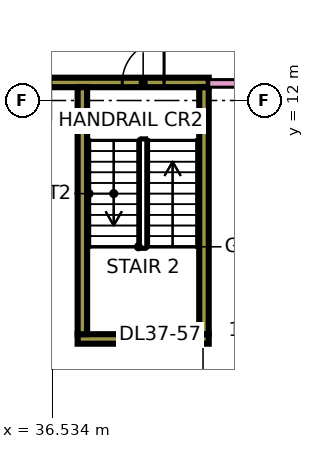
"""IFC4 building model, lengths in metres.
Left out: names, types, materials, properties, quantities, classifications, styles, units other than length and angle.
Written with IfcOpenShell. Run it as: python <this file> out.ifc"""

import sys

from ifc_helpers import new_model, si_unit, direction, frame, frame_2d, origin, place, context, subcontext, project, spatial, rectangle, extrude, element, fill, save


model = new_model("IFC4")
c1 = context("Model", 3, precision=1e-05, world=origin(), true_north=direction((0.0, 1.0)))
c2 = subcontext(c1, "Body", "Model", "MODEL_VIEW")
j1 = project(units=[si_unit("LENGTHUNIT", "METRE"), si_unit("PLANEANGLEUNIT", "RADIAN")], contexts=[c1])
p1 = place(None, origin())
s1 = spatial("IfcSite", under=j1, at=p1, CompositionType="ELEMENT")
p2 = place(p1, origin())
s2 = spatial("IfcBuilding", under=s1, at=p2, CompositionType="ELEMENT")
p3 = place(p2, frame((0.0, 0.0, 164.9)))
s3 = spatial("IfcBuildingStorey", under=s2, at=p3, CompositionType="ELEMENT", Elevation=164.9)
p4 = place(p3, frame((37.2, 5.725, 0.0), z_axis=(0.0, 0.0, 1.0), x_axis=(1.0, 0.0, 0.0)))
e1 = element("IfcWall", 1, at=p4, inside=s3, PredefinedType="SHEAR", context=c2, shape_type="SweptSolid", body=[
    extrude(rectangle(XDim=3.45, YDim=0.25, at=frame_2d((1.725, 0.0))), origin(), (0.0, 0.0, 1.0), 3.75),
])
p5 = place(p3, frame((36.45, 12.475, 0.0), z_axis=(0.0, 0.0, 1.0), x_axis=(1.0, 0.0, 0.0)))
e2 = element("IfcWall", 2, at=p5, inside=s3, PredefinedType="SHEAR", context=c2, shape_type="SweptSolid", body=[
    extrude(rectangle(XDim=4.2, YDim=0.25, at=frame_2d((2.1, 0.0))), origin(), (0.0, 0.0, 1.0), 3.75),
])
p6 = place(p5, frame((1.925, 0.0, 0.0)))
e3 = element("IfcOpeningElement", 3, at=p6, cuts=e2, PredefinedType="OPENING", context=c2, shape_type="SweptSolid", body=[
    extrude(rectangle(XDim=1.1, YDim=2.2, at=frame_2d((0.55, 1.1))), frame((0.0, 0.135, 0.0), z_axis=(0.0, -1.0, 0.0), x_axis=(1.0, 0.0, 0.0)), (0.0, 0.0, 1.0), 0.27),
])
for number, where, z_axis, x_axis in (
    (4, (37.325, 5.85, 0.0), (0.0, 0.0, 1.0), (0.0, 1.0, 0.0)),
    (5, (40.525, 5.85, 0.0), (0.0, 0.0, 1.0), (0.0, 1.0, 0.0)),
):
    element("IfcWall", number, at=place(p3, frame(where, z_axis=z_axis, x_axis=x_axis)), inside=s3, PredefinedType="SHEAR", context=c2, shape_type="SweptSolid", body=[
        extrude(rectangle(XDim=6.5, YDim=0.25, at=frame_2d((3.25, 0.0))), origin(), (0.0, 0.0, 1.0), 3.75),
    ])
p7 = place(p3, frame((40.65, 12.45, 0.0), z_axis=(0.0, 0.0, 1.0), x_axis=(1.0, 0.0, 0.0)))
e6 = element("IfcWall", 6, at=p7, inside=s3, PredefinedType="PARTITIONING", context=c2, shape_type="SweptSolid", body=[
    extrude(rectangle(XDim=22.276, YDim=0.2, at=frame_2d((11.138, 0.0))), origin(), (0.0, 0.0, 1.0), 3.35),
])
p8 = place(p7, frame((11.85, 0.0, 0.0)))
e7 = element("IfcOpeningElement", 7, at=p8, cuts=e6, PredefinedType="OPENING", context=c2, shape_type="SweptSolid", body=[
    extrude(rectangle(XDim=1.0, YDim=2.1, at=frame_2d((0.5, 1.05))), frame((0.0, 0.11, 0.0), z_axis=(0.0, -1.0, 0.0), x_axis=(1.0, 0.0, 0.0)), (0.0, 0.0, 1.0), 0.22),
])
p9 = place(p7, frame((1.05, 0.0, 0.0)))
e8 = element("IfcOpeningElement", 8, at=p9, cuts=e6, PredefinedType="OPENING", context=c2, shape_type="SweptSolid", body=[
    extrude(rectangle(XDim=1.0, YDim=2.1, at=frame_2d((0.5, 1.05))), frame((0.0, 0.11, 0.0), z_axis=(0.0, -1.0, 0.0), x_axis=(1.0, 0.0, 0.0)), (0.0, 0.0, 1.0), 0.22),
])
p10 = place(p6, frame((1.1, 0.0, 0.0), z_axis=(0.0, 0.0, 1.0), x_axis=(-1.0, 0.0, 0.0)))
e9 = element("IfcDoor", 9, at=p10, inside=s3, OperationType="SINGLE_SWING_RIGHT", PredefinedType="DOOR", context=c2, shape_type="SweptSolid", body=[
    extrude(rectangle(XDim=1.1, YDim=2.2, at=frame_2d((0.55, 1.1))), frame((0.0, 0.025, 0.0), z_axis=(0.0, -1.0, 0.0), x_axis=(1.0, 0.0, 0.0)), (0.0, 0.0, 1.0), 0.05),
])
fill(e3, e9)
save(model, sys.argv[1])
